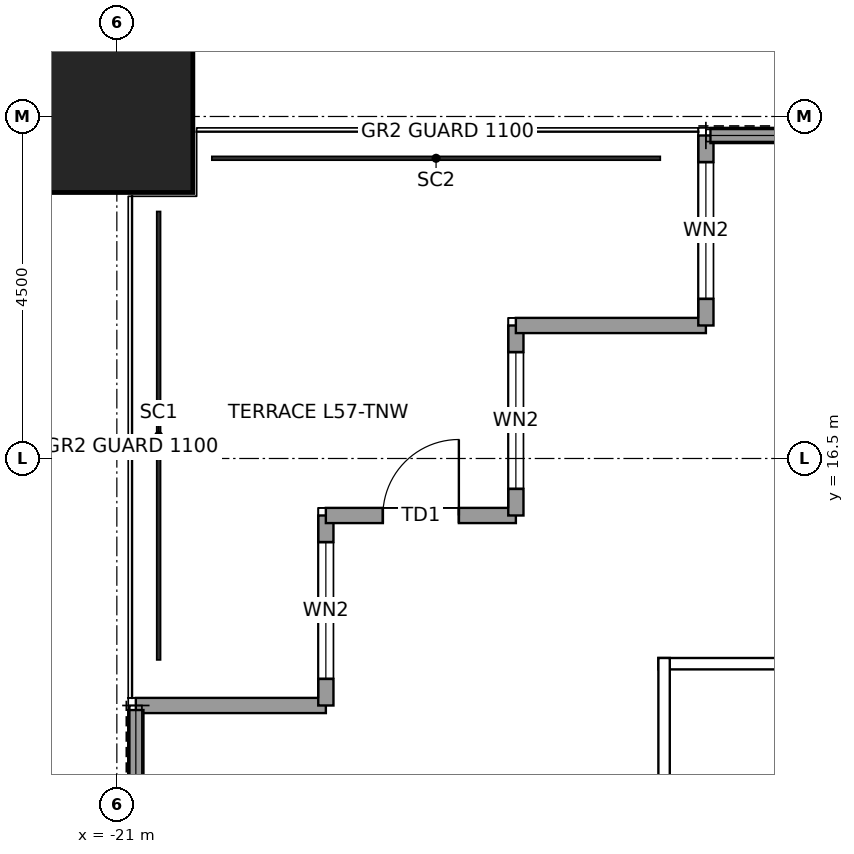
"""IFC4 building model, lengths in metres.
Left out: names, types, materials, properties, quantities, classifications, styles, units other than length and angle.
Written with IfcOpenShell. Run it as: python <this file> out.ifc"""

import sys

from ifc_helpers import new_model, si_unit, direction, frame, frame_2d, origin, origin_2d, place, context, subcontext, project, spatial, rectangle, hollow_rectangle, extrude, element, fill, save


model = new_model("IFC4")
c1 = context("Model", 3, precision=1e-05, world=origin(), true_north=direction((0.0, 1.0)))
c2 = subcontext(c1, "Body", "Model", "MODEL_VIEW")
j1 = project(units=[si_unit("LENGTHUNIT", "METRE"), si_unit("PLANEANGLEUNIT", "RADIAN")], contexts=[c1])
p1 = place(None, origin())
s1 = spatial("IfcSite", under=j1, at=p1, CompositionType="ELEMENT")
p2 = place(p1, origin())
s2 = spatial("IfcBuilding", under=s1, at=p2, CompositionType="ELEMENT")
p3 = place(p2, frame((0.0, 0.0, 263.9)))
s3 = spatial("IfcBuildingStorey", under=s2, at=p3, CompositionType="ELEMENT", Elevation=263.9)
p4 = place(p3, frame((-21.0, 21.0, 0.0), z_axis=(0.0, 0.0, 1.0), x_axis=(1.0, 0.0, 0.0)))
e1 = element("IfcColumn", 1, at=p4, inside=s3, PredefinedType="COLUMN", context=c2, shape_type="SweptSolid", body=[
    extrude(hollow_rectangle(XDim=2.0, YDim=2.0, WallThickness=0.095, at=origin_2d()), origin(), (0.0, 0.0, 1.0), 4.0),
])
p5 = place(p3, frame((-20.75, 13.25, 0.0), z_axis=(0.0, 0.0, 1.0), x_axis=(1.0, 0.0, 0.0)))
e2 = element("IfcWall", 2, at=p5, inside=s3, PredefinedType="SOLIDWALL", context=c2, shape_type="SweptSolid", body=[
    extrude(rectangle(XDim=2.5, YDim=0.2, at=frame_2d((1.25, 0.0))), origin(), (0.0, 0.0, 1.0), 3.85),
])
p6 = place(p3, frame((-18.25, 13.25, 0.0), z_axis=(0.0, 0.0, 1.0), x_axis=(0.0, 1.0, 0.0)))
e3 = element("IfcWall", 3, at=p6, inside=s3, PredefinedType="SOLIDWALL", context=c2, shape_type="SweptSolid", body=[
    extrude(rectangle(XDim=2.5, YDim=0.2, at=frame_2d((1.25, 0.0))), origin(), (0.0, 0.0, 1.0), 3.85),
])
p7 = place(p6, frame((0.35, 0.0, 0.3)))
e4 = element("IfcOpeningElement", 4, at=p7, cuts=e3, PredefinedType="OPENING", context=c2, shape_type="SweptSolid", body=[
    extrude(rectangle(XDim=1.8, YDim=2.4, at=frame_2d((0.9, 1.2))), frame((0.0, 0.11, 0.0), z_axis=(0.0, -1.0, 0.0), x_axis=(1.0, 0.0, 0.0)), (0.0, 0.0, 1.0), 0.22),
])
p8 = place(p3, frame((-18.25, 15.75, 0.0), z_axis=(0.0, 0.0, 1.0), x_axis=(1.0, 0.0, 0.0)))
e5 = element("IfcWall", 5, at=p8, inside=s3, PredefinedType="SOLIDWALL", context=c2, shape_type="SweptSolid", body=[
    extrude(rectangle(XDim=2.5, YDim=0.2, at=frame_2d((1.25, 0.0))), origin(), (0.0, 0.0, 1.0), 3.317),
])
p9 = place(p8, frame((0.75, 0.0, 0.0)))
e6 = element("IfcOpeningElement", 6, at=p9, cuts=e5, PredefinedType="OPENING", context=c2, shape_type="SweptSolid", body=[
    extrude(rectangle(XDim=1.0, YDim=2.4, at=frame_2d((0.5, 1.2))), frame((0.0, 0.11, 0.0), z_axis=(0.0, -1.0, 0.0), x_axis=(1.0, 0.0, 0.0)), (0.0, 0.0, 1.0), 0.22),
])
p10 = place(p3, frame((-15.75, 15.75, 0.0), z_axis=(0.0, 0.0, 1.0), x_axis=(0.0, 1.0, 0.0)))
e7 = element("IfcWall", 7, at=p10, inside=s3, PredefinedType="SOLIDWALL", context=c2, shape_type="SweptSolid", body=[
    extrude(rectangle(XDim=2.5, YDim=0.2, at=frame_2d((1.25, 0.0))), origin(), (0.0, 0.0, 1.0), 3.85),
])
p11 = place(p10, frame((0.35, 0.0, 0.3)))
e8 = element("IfcOpeningElement", 8, at=p11, cuts=e7, PredefinedType="OPENING", context=c2, shape_type="SweptSolid", body=[
    extrude(rectangle(XDim=1.8, YDim=2.4, at=frame_2d((0.9, 1.2))), frame((0.0, 0.11, 0.0), z_axis=(0.0, -1.0, 0.0), x_axis=(1.0, 0.0, 0.0)), (0.0, 0.0, 1.0), 0.22),
])
p12 = place(p3, frame((-15.75, 18.25, 0.0), z_axis=(0.0, 0.0, 1.0), x_axis=(1.0, 0.0, 0.0)))
e9 = element("IfcWall", 9, at=p12, inside=s3, PredefinedType="SOLIDWALL", context=c2, shape_type="SweptSolid", body=[
    extrude(rectangle(XDim=2.5, YDim=0.2, at=frame_2d((1.25, 0.0))), origin(), (0.0, 0.0, 1.0), 3.85),
])
p13 = place(p3, frame((-13.25, 18.25, 0.0), z_axis=(0.0, 0.0, 1.0), x_axis=(0.0, 1.0, 0.0)))
e10 = element("IfcWall", 10, at=p13, inside=s3, PredefinedType="SOLIDWALL", context=c2, shape_type="SweptSolid", body=[
    extrude(rectangle(XDim=2.5, YDim=0.2, at=frame_2d((1.25, 0.0))), origin(), (0.0, 0.0, 1.0), 3.85),
])
p14 = place(p13, frame((0.35, 0.0, 0.3)))
e11 = element("IfcOpeningElement", 11, at=p14, cuts=e10, PredefinedType="OPENING", context=c2, shape_type="SweptSolid", body=[
    extrude(rectangle(XDim=1.8, YDim=2.4, at=frame_2d((0.9, 1.2))), frame((0.0, 0.11, 0.0), z_axis=(0.0, -1.0, 0.0), x_axis=(1.0, 0.0, 0.0)), (0.0, 0.0, 1.0), 0.22),
])
for number, where, z_axis, x_axis in (
    (12, (-13.19, 20.75, 0.0), (0.0, 0.0, 1.0), (1.0, 0.0, 0.0)),
    (13, (-20.75, 10.435, 0.0), (0.0, 0.0, 1.0), (0.0, 1.0, 0.0)),
):
    element("IfcWall", number, at=place(p3, frame(where, z_axis=z_axis, x_axis=x_axis)), inside=s3, PredefinedType="SOLIDWALL", context=c2, shape_type="SweptSolid", body=[
        extrude(rectangle(XDim=2.755, YDim=0.2, at=frame_2d((1.377, 0.0))), origin(), (0.0, 0.0, 1.0), 3.85),
    ])
p15 = place(p3, frame((-13.875, 13.8, 0.0), z_axis=(0.0, 0.0, 1.0), x_axis=(1.0, 0.0, 0.0)))
e14 = element("IfcWall", 14, at=p15, inside=s3, PredefinedType="PARTITIONING", context=c2, shape_type="SweptSolid", body=[
    extrude(rectangle(XDim=27.75, YDim=0.15, at=frame_2d((13.875, 0.0))), origin(), (0.0, 0.0, 1.0), 3.85),
])
p16 = place(p15, frame((20.275, 0.0, 0.0)))
e15 = element("IfcOpeningElement", 15, at=p16, cuts=e14, PredefinedType="OPENING", context=c2, shape_type="SweptSolid", body=[
    extrude(rectangle(XDim=1.0, YDim=2.4, at=frame_2d((0.5, 1.2))), frame((0.0, 0.085, 0.0), z_axis=(0.0, -1.0, 0.0), x_axis=(1.0, 0.0, 0.0)), (0.0, 0.0, 1.0), 0.17),
])
p17 = place(p3, frame((-13.8, -13.875, 0.0), z_axis=(0.0, 0.0, 1.0), x_axis=(0.0, 1.0, 0.0)))
e16 = element("IfcWall", 16, at=p17, inside=s3, PredefinedType="PARTITIONING", context=c2, shape_type="SweptSolid", body=[
    extrude(rectangle(XDim=27.75, YDim=0.15, at=frame_2d((13.875, 0.0))), origin(), (0.0, 0.0, 1.0), 3.85),
])
p18 = place(p7, origin())
e17 = element("IfcWindow", 17, at=p18, inside=s3, PartitioningType="SINGLE_PANEL", PredefinedType="WINDOW", context=c2, shape_type="SweptSolid", body=[
    extrude(rectangle(XDim=1.8, YDim=2.4, at=frame_2d((0.9, 1.2))), frame((0.0, 0.03, 0.0), z_axis=(0.0, -1.0, 0.0), x_axis=(1.0, 0.0, 0.0)), (0.0, 0.0, 1.0), 0.06),
])
fill(e4, e17)
p19 = place(p9, origin())
e18 = element("IfcDoor", 18, at=p19, inside=s3, OperationType="SINGLE_SWING_RIGHT", PredefinedType="DOOR", context=c2, shape_type="SweptSolid", body=[
    extrude(rectangle(XDim=1.0, YDim=2.4, at=frame_2d((0.5, 1.2))), frame((0.0, 0.025, 0.0), z_axis=(0.0, -1.0, 0.0), x_axis=(1.0, 0.0, 0.0)), (0.0, 0.0, 1.0), 0.05),
])
fill(e6, e18)
p20 = place(p11, origin())
e19 = element("IfcWindow", 19, at=p20, inside=s3, PartitioningType="SINGLE_PANEL", PredefinedType="WINDOW", context=c2, shape_type="SweptSolid", body=[
    extrude(rectangle(XDim=1.8, YDim=2.4, at=frame_2d((0.9, 1.2))), frame((0.0, 0.03, 0.0), z_axis=(0.0, -1.0, 0.0), x_axis=(1.0, 0.0, 0.0)), (0.0, 0.0, 1.0), 0.06),
])
fill(e8, e19)
p21 = place(p14, origin())
e20 = element("IfcWindow", 20, at=p21, inside=s3, PartitioningType="SINGLE_PANEL", PredefinedType="WINDOW", context=c2, shape_type="SweptSolid", body=[
    extrude(rectangle(XDim=1.8, YDim=2.4, at=frame_2d((0.9, 1.2))), frame((0.0, 0.03, 0.0), z_axis=(0.0, -1.0, 0.0), x_axis=(1.0, 0.0, 0.0)), (0.0, 0.0, 1.0), 0.06),
])
fill(e11, e20)
save(model, sys.argv[1])
